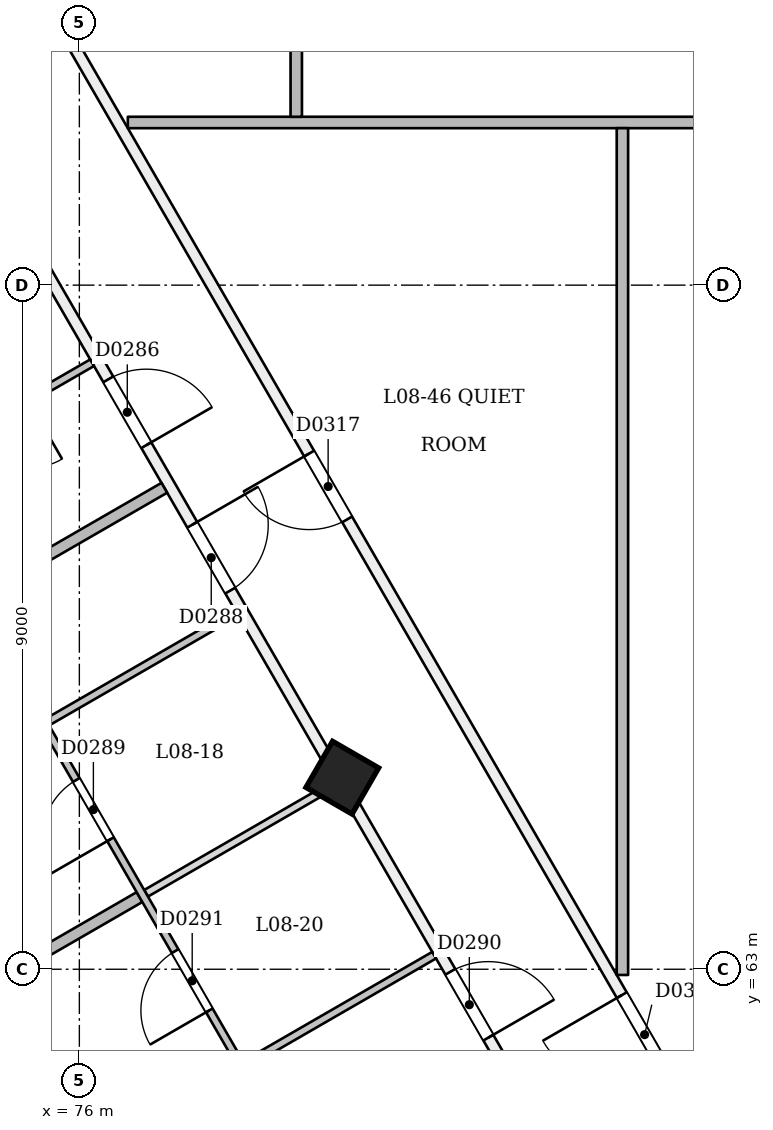
"""IFC4 building model, lengths in metres.
Left out: names, types, materials, properties, quantities, classifications, styles, units other than length and angle.
Written with IfcOpenShell. Run it as: python <this file> out.ifc"""

import sys

from ifc_helpers import new_model, si_unit, direction, frame, frame_2d, origin, origin_2d, place, context, subcontext, project, spatial, rectangle, extrude, element, fill, save


model = new_model("IFC4")
c1 = context("Model", 3, precision=1e-05, world=origin(), true_north=direction((0.0, 1.0)))
c2 = subcontext(c1, "Body", "Model", "MODEL_VIEW")
j1 = project(units=[si_unit("LENGTHUNIT", "METRE"), si_unit("PLANEANGLEUNIT", "RADIAN")], contexts=[c1])
p1 = place(None, origin())
s1 = spatial("IfcSite", under=j1, at=p1, CompositionType="ELEMENT")
p2 = place(p1, origin())
s2 = spatial("IfcBuilding", under=s1, at=p2, CompositionType="ELEMENT")
p3 = place(p2, frame((0.0, 0.0, 37.8)))
s3 = spatial("IfcBuildingStorey", under=s2, at=p3, CompositionType="ELEMENT", Elevation=37.8)
p4 = place(p3, frame((79.432, 65.473, -0.021), z_axis=(0.022222852987, 0.038483477124, 0.999012095419), x_axis=(-0.865638243434, -0.499188640565, 0.038485486042)))
e1 = element("IfcColumn", 1, at=p4, inside=s3, PredefinedType="COLUMN", context=c2, shape_type="SweptSolid", body=[
    extrude(rectangle(XDim=0.7, YDim=0.7, at=origin_2d()), origin(), (0.0, 0.0, 1.0), 3.604),
])
p5 = place(p3, frame((61.497, 96.54, 0.0), z_axis=(0.0, 0.0, 1.0), x_axis=(0.499995935097, -0.866027750645, 0.0)))
e2 = element("IfcWall", 2, at=p5, inside=s3, PredefinedType="PARTITIONING", context=c2, shape_type="SweptSolid", body=[
    extrude(rectangle(XDim=44.742, YDim=0.15, at=frame_2d((22.371, 0.0))), origin(), (0.0, 0.0, 1.0), 2.7),
])
p6 = place(p5, frame((1.84, 0.0, 0.0)))
e3 = element("IfcOpeningElement", 3, at=p6, cuts=e2, PredefinedType="OPENING", context=c2, shape_type="SweptSolid", body=[
    extrude(rectangle(XDim=1.0, YDim=2.1, at=frame_2d((0.5, 1.05))), frame((0.0, 0.085, 0.0), z_axis=(0.0, -1.0, 0.0), x_axis=(1.0, 0.0, 0.0)), (0.0, 0.0, 1.0), 0.171),
])
p7 = place(p5, frame((4.942, 0.0, 0.0)))
e4 = element("IfcOpeningElement", 4, at=p7, cuts=e2, PredefinedType="OPENING", context=c2, shape_type="SweptSolid", body=[
    extrude(rectangle(XDim=1.1, YDim=2.1, at=frame_2d((0.55, 1.05))), frame((0.0, 0.085, 0.0), z_axis=(0.0, -1.0, 0.0), x_axis=(1.0, 0.0, 0.0)), (0.0, 0.0, 1.0), 0.171),
])
p8 = place(p5, frame((11.651, 0.0, 0.0)))
e5 = element("IfcOpeningElement", 5, at=p8, cuts=e2, PredefinedType="OPENING", context=c2, shape_type="SweptSolid", body=[
    extrude(rectangle(XDim=1.0, YDim=2.1, at=frame_2d((0.5, 1.05))), frame((0.0, 0.085, 0.0), z_axis=(0.0, -1.0, 0.0), x_axis=(1.0, 0.0, 0.0)), (0.0, 0.0, 1.0), 0.171),
])
p9 = place(p5, frame((18.371, 0.0, 0.0)))
e6 = element("IfcOpeningElement", 6, at=p9, cuts=e2, PredefinedType="OPENING", context=c2, shape_type="SweptSolid", body=[
    extrude(rectangle(XDim=1.2, YDim=2.1, at=frame_2d((0.6, 1.05))), frame((0.0, 0.085, 0.0), z_axis=(0.0, -1.0, 0.0), x_axis=(1.0, 0.0, 0.0)), (0.0, 0.0, 1.0), 0.171),
])
p10 = place(p5, frame((23.092, 0.0, 0.0)))
e7 = element("IfcOpeningElement", 7, at=p10, cuts=e2, PredefinedType="OPENING", context=c2, shape_type="SweptSolid", body=[
    extrude(rectangle(XDim=1.0, YDim=2.1, at=frame_2d((0.5, 1.05))), frame((0.0, 0.085, 0.0), z_axis=(0.0, -1.0, 0.0), x_axis=(1.0, 0.0, 0.0)), (0.0, 0.0, 1.0), 0.171),
])
p11 = place(p5, frame((29.767, 0.0, 0.0)))
e8 = element("IfcOpeningElement", 8, at=p11, cuts=e2, PredefinedType="OPENING", context=c2, shape_type="SweptSolid", body=[
    extrude(rectangle(XDim=1.0, YDim=2.1, at=frame_2d((0.5, 1.05))), frame((0.0, 0.085, 0.0), z_axis=(0.0, -1.0, 0.0), x_axis=(1.0, 0.0, 0.0)), (0.0, 0.0, 1.0), 0.171),
])
p12 = place(p5, frame((31.976, 0.0, 0.0)))
e9 = element("IfcOpeningElement", 9, at=p12, cuts=e2, PredefinedType="OPENING", context=c2, shape_type="SweptSolid", body=[
    extrude(rectangle(XDim=1.0, YDim=2.1, at=frame_2d((0.5, 1.05))), frame((0.0, 0.085, 0.0), z_axis=(0.0, -1.0, 0.0), x_axis=(1.0, 0.0, 0.0)), (0.0, 0.0, 1.0), 0.171),
])
p13 = place(p5, frame((38.767, 0.0, 0.0)))
e10 = element("IfcOpeningElement", 10, at=p13, cuts=e2, PredefinedType="OPENING", context=c2, shape_type="SweptSolid", body=[
    extrude(rectangle(XDim=1.0, YDim=2.1, at=frame_2d((0.5, 1.05))), frame((0.0, 0.085, 0.0), z_axis=(0.0, -1.0, 0.0), x_axis=(1.0, 0.0, 0.0)), (0.0, 0.0, 1.0), 0.171),
])
p14 = place(p5, frame((40.707, 0.0, 0.0)))
e11 = element("IfcOpeningElement", 11, at=p14, cuts=e2, PredefinedType="OPENING", context=c2, shape_type="SweptSolid", body=[
    extrude(rectangle(XDim=1.0, YDim=2.1, at=frame_2d((0.5, 1.05))), frame((0.0, 0.085, 0.0), z_axis=(0.0, -1.0, 0.0), x_axis=(1.0, 0.0, 0.0)), (0.0, 0.0, 1.0), 0.171),
])
p15 = place(p3, frame((84.907, 59.593, 0.0), z_axis=(0.0, 0.0, 1.0), x_axis=(-0.500002425896, 0.866024003188, 0.0)))
e12 = element("IfcWall", 12, at=p15, inside=s3, PredefinedType="PARTITIONING", context=c2, shape_type="SweptSolid", body=[
    extrude(rectangle(XDim=35.804, YDim=0.15, at=frame_2d((17.902, 0.0))), origin(), (0.0, 0.0, 1.0), 3.1),
])
p16 = place(p15, frame((2.341, 0.0, 0.0)))
e13 = element("IfcOpeningElement", 13, at=p16, cuts=e12, PredefinedType="OPENING", context=c2, shape_type="SweptSolid", body=[
    extrude(rectangle(XDim=1.2, YDim=2.1, at=frame_2d((0.6, 1.05))), frame((0.0, 0.085, 0.0), z_axis=(0.0, -1.0, 0.0), x_axis=(1.0, 0.0, 0.0)), (0.0, 0.0, 1.0), 0.171),
])
p17 = place(p15, frame((20.792, 0.0, 0.0)))
e14 = element("IfcOpeningElement", 14, at=p17, cuts=e12, PredefinedType="OPENING", context=c2, shape_type="SweptSolid", body=[
    extrude(rectangle(XDim=1.2, YDim=2.1, at=frame_2d((0.6, 1.05))), frame((0.0, 0.085, 0.0), z_axis=(0.0, -1.0, 0.0), x_axis=(1.0, 0.0, 0.0)), (0.0, 0.0, 1.0), 0.171),
])
p18 = place(p15, frame((10.768, 0.0, 0.0)))
e15 = element("IfcOpeningElement", 15, at=p18, cuts=e12, PredefinedType="OPENING", context=c2, shape_type="SweptSolid", body=[
    extrude(rectangle(XDim=1.0, YDim=2.1, at=frame_2d((0.5, 1.05))), frame((0.0, 0.085, 0.0), z_axis=(0.0, -1.0, 0.0), x_axis=(1.0, 0.0, 0.0)), (0.0, 0.0, 1.0), 0.171),
])
p19 = place(p15, frame((29.859, 0.0, 0.0)))
e16 = element("IfcOpeningElement", 16, at=p19, cuts=e12, PredefinedType="OPENING", context=c2, shape_type="SweptSolid", body=[
    extrude(rectangle(XDim=1.0, YDim=2.1, at=frame_2d((0.5, 1.05))), frame((0.0, 0.085, 0.0), z_axis=(0.0, -1.0, 0.0), x_axis=(1.0, 0.0, 0.0)), (0.0, 0.0, 1.0), 0.171),
])
p20 = place(p3, frame((76.168, 70.979, 0.0), z_axis=(0.0, 0.0, 1.0), x_axis=(-0.866046596414, -0.499963291492, 0.0)))
e17 = element("IfcWall", 17, at=p20, inside=s3, PredefinedType="PARTITIONING", context=c2, shape_type="SweptSolid", body=[
    extrude(rectangle(XDim=2.925, YDim=0.1, at=frame_2d((1.462, 0.0))), origin(), (0.0, 0.0, 1.0), 3.1),
])
p21 = place(p20, frame((0.975, 0.0, 0.0)))
e18 = element("IfcOpeningElement", 18, at=p21, cuts=e17, PredefinedType="OPENING", context=c2, shape_type="SweptSolid", body=[
    extrude(rectangle(XDim=0.9, YDim=2.1, at=frame_2d((0.45, 1.05))), frame((0.0, 0.061, 0.0), z_axis=(0.0, -1.0, 0.0), x_axis=(1.0, 0.0, 0.0)), (0.0, 0.0, 1.0), 0.121),
])
p22 = place(p3, frame((71.623, 66.161, 0.0), z_axis=(0.0, 0.0, 1.0), x_axis=(0.866025401434, 0.500000004071, 0.0)))
e19 = element("IfcWall", 19, at=p22, inside=s3, PredefinedType="PARTITIONING", context=c2, shape_type="SweptSolid", body=[
    extrude(rectangle(XDim=6.345, YDim=0.15, at=frame_2d((3.173, 0.0))), origin(), (0.0, 0.0, 1.0), 2.6),
])
p23 = place(p3, frame((78.135, 61.723, 0.0), z_axis=(0.0, 0.0, 1.0), x_axis=(-0.500006934395, 0.866021400173, 0.0)))
e20 = element("IfcWall", 20, at=p23, inside=s3, PredefinedType="PARTITIONING", context=c2, shape_type="SweptSolid", body=[
    extrude(rectangle(XDim=5.2, YDim=0.1, at=frame_2d((2.6, 0.0))), origin(), (0.0, 0.0, 1.0), 2.7),
])
p24 = place(p23, frame((3.45, 0.0, 0.0)))
e21 = element("IfcOpeningElement", 21, at=p24, cuts=e20, PredefinedType="OPENING", context=c2, shape_type="SweptSolid", body=[
    extrude(rectangle(XDim=0.9, YDim=2.1, at=frame_2d((0.45, 1.05))), frame((0.0, 0.061, 0.0), z_axis=(0.0, -1.0, 0.0), x_axis=(1.0, 0.0, 0.0)), (0.0, 0.0, 1.0), 0.121),
])
p25 = place(p23, frame((0.85, 0.0, 0.0)))
e22 = element("IfcOpeningElement", 22, at=p25, cuts=e20, PredefinedType="OPENING", context=c2, shape_type="SweptSolid", body=[
    extrude(rectangle(XDim=0.9, YDim=2.1, at=frame_2d((0.45, 1.05))), frame((0.0, 0.061, 0.0), z_axis=(0.0, -1.0, 0.0), x_axis=(1.0, 0.0, 0.0)), (0.0, 0.0, 1.0), 0.121),
])
p26 = place(p3, frame((75.534, 66.226, 0.0), z_axis=(0.0, 0.0, 1.0), x_axis=(0.866046596414, 0.499963291492, 0.0)))
e23 = element("IfcWall", 23, at=p26, inside=s3, PredefinedType="PARTITIONING", context=c2, shape_type="SweptSolid", body=[
    extrude(rectangle(XDim=2.925, YDim=0.1, at=frame_2d((1.462, 0.0))), origin(), (0.0, 0.0, 1.0), 3.1),
])
p27 = place(p3, frame((73.89, 62.274, 0.0), z_axis=(0.0, 0.0, 1.0), x_axis=(0.86604601856, 0.499964292462, 0.0)))
e24 = element("IfcWall", 24, at=p27, inside=s3, PredefinedType="PARTITIONING", context=c2, shape_type="SweptSolid", body=[
    extrude(rectangle(XDim=3.35, YDim=0.15, at=frame_2d((1.675, 0.0))), origin(), (0.0, 0.0, 1.0), 2.6),
])
p28 = place(p3, frame((76.878, 63.999, 0.0), z_axis=(0.0, 0.0, 1.0), x_axis=(0.866018712932, 0.500011588718, 0.0)))
e25 = element("IfcWall", 25, at=p28, inside=s3, PredefinedType="PARTITIONING", context=c2, shape_type="SweptSolid", body=[
    extrude(rectangle(XDim=2.875, YDim=0.1, at=frame_2d((1.438, 0.0))), origin(), (0.0, 0.0, 1.0), 2.7),
])
p29 = place(p3, frame((80.668, 63.185, 0.0), z_axis=(0.0, 0.0, 1.0), x_axis=(-0.866046596414, -0.499963291492, 0.0)))
e26 = element("IfcWall", 26, at=p29, inside=s3, PredefinedType="PARTITIONING", context=c2, shape_type="SweptSolid", body=[
    extrude(rectangle(XDim=2.925, YDim=0.1, at=frame_2d((1.462, 0.0))), origin(), (0.0, 0.0, 1.0), 3.1),
])
p30 = place(p3, frame((76.638, 74.14, 0.0), z_axis=(0.0, 0.0, 1.0), x_axis=(1.0, 0.0, 0.0)))
e27 = element("IfcWall", 27, at=p30, inside=s3, PredefinedType="PARTITIONING", context=c2, shape_type="SweptSolid", body=[
    extrude(rectangle(XDim=11.398, YDim=0.15, at=frame_2d((5.699, 0.0))), origin(), (0.0, 0.0, 1.0), 3.1),
])
p31 = place(p3, frame((78.854, 90.524, 0.0), z_axis=(0.0, 0.0, 1.0), x_axis=(0.0, -1.0, 0.0)))
e28 = element("IfcWall", 28, at=p31, inside=s3, PredefinedType="PARTITIONING", context=c2, shape_type="SweptSolid", body=[
    extrude(rectangle(XDim=16.309, YDim=0.15, at=frame_2d((8.155, 0.0))), origin(), (0.0, 0.0, 1.0), 3.1),
])
p32 = place(p3, frame((83.145, 74.065, 0.0), z_axis=(0.0, 0.0, 1.0), x_axis=(0.0, -1.0, 0.0)))
e29 = element("IfcWall", 29, at=p32, inside=s3, PredefinedType="PARTITIONING", context=c2, shape_type="SweptSolid", body=[
    extrude(rectangle(XDim=11.14, YDim=0.15, at=frame_2d((5.57, 0.0))), origin(), (0.0, 0.0, 1.0), 3.1),
])
p33 = place(p11, origin())
e30 = element("IfcDoor", 30, at=p33, inside=s3, OperationType="SINGLE_SWING_RIGHT", PredefinedType="NOTDEFINED", context=c2, shape_type="SweptSolid", body=[
    extrude(rectangle(XDim=1.0, YDim=2.1, at=frame_2d((0.5, 1.05))), frame((0.0, 0.025, 0.0), z_axis=(0.0, -1.0, 0.0), x_axis=(1.0, 0.0, 0.0)), (0.0, 0.0, 1.0), 0.05),
])
fill(e8, e30)
p34 = place(p12, origin())
e31 = element("IfcDoor", 31, at=p34, inside=s3, OperationType="SINGLE_SWING_LEFT", PredefinedType="NOTDEFINED", context=c2, shape_type="SweptSolid", body=[
    extrude(rectangle(XDim=1.0, YDim=2.1, at=frame_2d((0.5, 1.05))), frame((0.0, 0.025, 0.0), z_axis=(0.0, -1.0, 0.0), x_axis=(1.0, 0.0, 0.0)), (0.0, 0.0, 1.0), 0.05),
])
fill(e9, e31)
p35 = place(p24, origin())
e32 = element("IfcDoor", 32, at=p35, inside=s3, OperationType="SINGLE_SWING_LEFT", PredefinedType="NOTDEFINED", context=c2, shape_type="SweptSolid", body=[
    extrude(rectangle(XDim=0.9, YDim=2.1, at=frame_2d((0.45, 1.05))), frame((0.0, 0.025, 0.0), z_axis=(0.0, -1.0, 0.0), x_axis=(1.0, 0.0, 0.0)), (0.0, 0.0, 1.0), 0.05),
])
fill(e21, e32)
p36 = place(p13, origin())
e33 = element("IfcDoor", 33, at=p36, inside=s3, OperationType="SINGLE_SWING_RIGHT", PredefinedType="NOTDEFINED", context=c2, shape_type="SweptSolid", body=[
    extrude(rectangle(XDim=1.0, YDim=2.1, at=frame_2d((0.5, 1.05))), frame((0.0, 0.025, 0.0), z_axis=(0.0, -1.0, 0.0), x_axis=(1.0, 0.0, 0.0)), (0.0, 0.0, 1.0), 0.05),
])
fill(e10, e33)
p37 = place(p25, origin())
e34 = element("IfcDoor", 34, at=p37, inside=s3, OperationType="SINGLE_SWING_LEFT", PredefinedType="NOTDEFINED", context=c2, shape_type="SweptSolid", body=[
    extrude(rectangle(XDim=0.9, YDim=2.1, at=frame_2d((0.45, 1.05))), frame((0.0, 0.025, 0.0), z_axis=(0.0, -1.0, 0.0), x_axis=(1.0, 0.0, 0.0)), (0.0, 0.0, 1.0), 0.05),
])
fill(e22, e34)
p38 = place(p16, origin())
e35 = element("IfcDoor", 35, at=p38, inside=s3, OperationType="SINGLE_SWING_RIGHT", PredefinedType="NOTDEFINED", context=c2, shape_type="SweptSolid", body=[
    extrude(rectangle(XDim=1.2, YDim=2.1, at=frame_2d((0.6, 1.05))), frame((0.0, 0.025, 0.0), z_axis=(0.0, -1.0, 0.0), x_axis=(1.0, 0.0, 0.0)), (0.0, 0.0, 1.0), 0.05),
])
fill(e13, e35)
p39 = place(p18, origin())
e36 = element("IfcDoor", 36, at=p39, inside=s3, OperationType="SINGLE_SWING_RIGHT", PredefinedType="NOTDEFINED", context=c2, shape_type="SweptSolid", body=[
    extrude(rectangle(XDim=1.0, YDim=2.1, at=frame_2d((0.5, 1.05))), frame((0.0, 0.025, 0.0), z_axis=(0.0, -1.0, 0.0), x_axis=(1.0, 0.0, 0.0)), (0.0, 0.0, 1.0), 0.05),
])
fill(e15, e36)
save(model, sys.argv[1])
